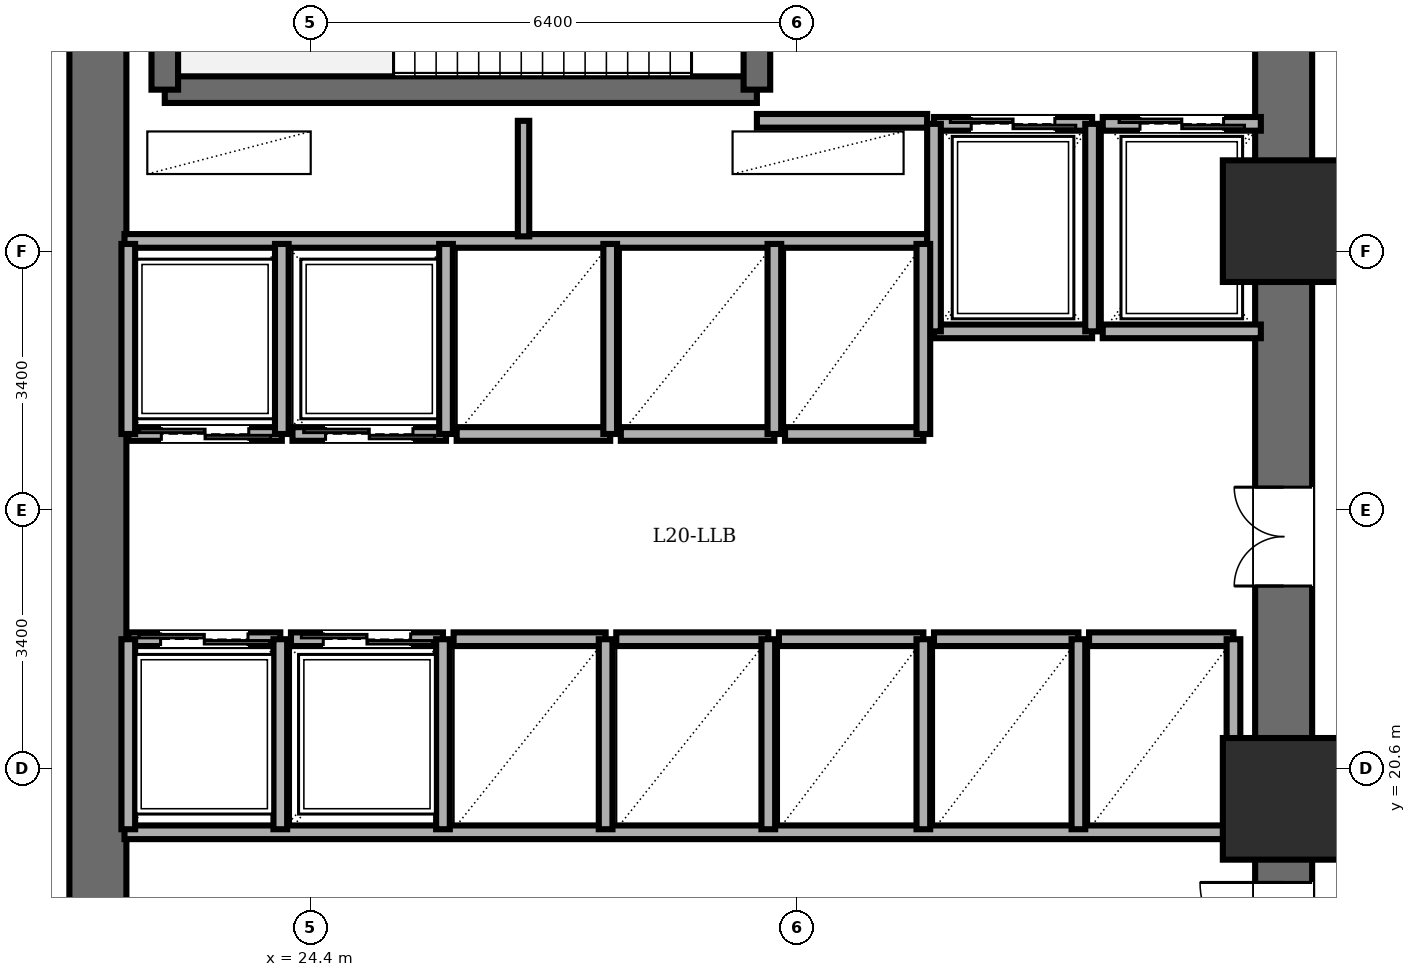
"""IFC4 building model, lengths in metres.
Left out: names, types, materials, properties, quantities, classifications, styles, units other than length and angle.
Written with IfcOpenShell. Run it as: python <this file> out.ifc"""

import sys

from ifc_helpers import new_model, si_unit, direction, frame, frame_2d, origin, origin_2d, place, context, subcontext, project, spatial, rectangle, extrude, element, fill, save


model = new_model("IFC4")
c1 = context("Model", 3, precision=1e-05, world=origin(), true_north=direction((0.0, 1.0)))
c2 = subcontext(c1, "Body", "Model", "MODEL_VIEW")
j1 = project(units=[si_unit("LENGTHUNIT", "METRE"), si_unit("PLANEANGLEUNIT", "RADIAN")], contexts=[c1])
p1 = place(None, origin())
s1 = spatial("IfcSite", under=j1, at=p1, CompositionType="ELEMENT")
p2 = place(p1, origin())
s2 = spatial("IfcBuilding", under=s1, at=p2, CompositionType="ELEMENT")
p3 = place(p2, frame((0.0, 0.0, 75.6)))
s3 = spatial("IfcBuildingStorey", under=s2, at=p3, CompositionType="ELEMENT", Elevation=75.6)
for number, where, z_axis, x_axis in (
    (1, (37.2, 20.2, 0.0), (0.0, 0.0, 1.0), (1.0, 0.0, 0.0)),
    (2, (37.2, 27.8, 0.0), (0.0, 0.0, 1.0), (1.0, 0.0, 0.0)),
):
    element("IfcColumn", number, at=place(p3, frame(where, z_axis=z_axis, x_axis=x_axis)), inside=s3, PredefinedType="COLUMN", context=c2, shape_type="SweptSolid", body=[
        extrude(rectangle(XDim=1.6, YDim=1.6, at=origin_2d()), origin(), (0.0, 0.0, 1.0), 5.6),
    ])
p4 = place(p3, frame((21.6, 14.4, 0.0), z_axis=(0.0, 0.0, 1.0), x_axis=(0.0, 1.0, 0.0)))
e3 = element("IfcWall", 3, at=p4, inside=s3, PredefinedType="SHEAR", context=c2, shape_type="SweptSolid", body=[
    extrude(rectangle(XDim=19.2, YDim=0.75, at=frame_2d((9.6, 0.0))), origin(), (0.0, 0.0, 1.0), 5.36),
])
p5 = place(p3, frame((37.2, 14.4, 0.0), z_axis=(0.0, 0.0, 1.0), x_axis=(0.0, 1.0, 0.0)))
e4 = element("IfcWall", 4, at=p5, inside=s3, PredefinedType="SHEAR", context=c2, shape_type="SweptSolid", body=[
    extrude(rectangle(XDim=19.2, YDim=0.75, at=frame_2d((9.6, 0.0))), origin(), (0.0, 0.0, 1.0), 5.36),
])
p6 = place(p5, frame((15.8, 0.0, 0.0)))
e5 = element("IfcOpeningElement", 5, at=p6, cuts=e4, PredefinedType="OPENING", context=c2, shape_type="SweptSolid", body=[
    extrude(rectangle(XDim=1.15, YDim=2.15, at=frame_2d((0.575, 1.075))), frame((0.0, 0.385, 0.0), z_axis=(0.0, -1.0, 0.0), x_axis=(1.0, 0.0, 0.0)), (0.0, 0.0, 1.0), 0.77),
])
p7 = place(p5, frame((3.6, 0.0, 0.0)))
e6 = element("IfcOpeningElement", 6, at=p7, cuts=e4, PredefinedType="OPENING", context=c2, shape_type="SweptSolid", body=[
    extrude(rectangle(XDim=1.1, YDim=2.15, at=frame_2d((0.55, 1.075))), frame((0.0, 0.385, 0.0), z_axis=(0.0, -1.0, 0.0), x_axis=(1.0, 0.0, 0.0)), (0.0, 0.0, 1.0), 0.77),
])
p8 = place(p5, frame((8.6, 0.0, 0.0)))
e7 = element("IfcOpeningElement", 7, at=p8, cuts=e4, PredefinedType="OPENING", context=c2, shape_type="SweptSolid", body=[
    extrude(rectangle(XDim=1.3, YDim=2.2, at=frame_2d((0.65, 1.1))), frame((0.0, 0.385, 0.0), z_axis=(0.0, -1.0, 0.0), x_axis=(1.0, 0.0, 0.0)), (0.0, 0.0, 1.0), 0.77),
])
p9 = place(p3, frame((22.48, 29.53, 0.0), z_axis=(0.0, 0.0, 1.0), x_axis=(1.0, 0.0, 0.0)))
e8 = element("IfcWall", 8, at=p9, inside=s3, PredefinedType="SOLIDWALL", context=c2, shape_type="SweptSolid", body=[
    extrude(rectangle(XDim=7.79, YDim=0.35, at=frame_2d((3.895, 0.0))), origin(), (0.0, 0.0, 1.0), 5.36),
])
p10 = place(p3, frame((22.48, 29.53, 0.0), z_axis=(0.0, 0.0, 1.0), x_axis=(0.0, 1.0, 0.0)))
e9 = element("IfcWall", 9, at=p10, inside=s3, PredefinedType="SOLIDWALL", context=c2, shape_type="SweptSolid", body=[
    extrude(rectangle(XDim=3.58, YDim=0.35, at=frame_2d((1.79, 0.0))), origin(), (0.0, 0.0, 1.0), 5.36),
])
p11 = place(p3, frame((30.27, 29.53, 0.0), z_axis=(0.0, 0.0, 1.0), x_axis=(0.0, 1.0, 0.0)))
e10 = element("IfcWall", 10, at=p11, inside=s3, PredefinedType="SOLIDWALL", context=c2, shape_type="SweptSolid", body=[
    extrude(rectangle(XDim=3.58, YDim=0.35, at=frame_2d((1.79, 0.0))), origin(), (0.0, 0.0, 1.0), 5.36),
])
p12 = place(p11, frame((1.25, 0.0, 0.0)))
e11 = element("IfcOpeningElement", 11, at=p12, cuts=e10, PredefinedType="OPENING", context=c2, shape_type="SweptSolid", body=[
    extrude(rectangle(XDim=1.1, YDim=2.15, at=frame_2d((0.55, 1.075))), frame((0.0, 0.185, 0.0), z_axis=(0.0, -1.0, 0.0), x_axis=(1.0, 0.0, 0.0)), (0.0, 0.0, 1.0), 0.37),
])
p13 = place(p3, frame((30.27, 29.12, 0.0), z_axis=(0.0, 0.0, 1.0), x_axis=(1.0, 0.0, 0.0)))
e12 = element("IfcWall", 12, at=p13, inside=s3, PredefinedType="PARTITIONING", context=c2, shape_type="SweptSolid", body=[
    extrude(rectangle(XDim=2.24, YDim=0.18, at=frame_2d((1.12, 0.0))), origin(), (0.0, 0.0, 1.0), 5.36),
])
p14 = place(p3, frame((21.95, 27.54, 0.0), z_axis=(0.0, 0.0, 1.0), x_axis=(1.0, 0.0, 0.0)))
e13 = element("IfcWall", 13, at=p14, inside=s3, PredefinedType="PARTITIONING", context=c2, shape_type="SweptSolid", body=[
    extrude(rectangle(XDim=10.56, YDim=0.18, at=frame_2d((5.28, 0.0))), origin(), (0.0, 0.0, 1.0), 5.36),
])
p15 = place(p3, frame((27.2, 27.6, 0.0), z_axis=(0.0, 0.0, 1.0), x_axis=(0.0, 1.0, 0.0)))
e14 = element("IfcWall", 14, at=p15, inside=s3, PredefinedType="PARTITIONING", context=c2, shape_type="SweptSolid", body=[
    extrude(rectangle(XDim=1.52, YDim=0.15, at=frame_2d((0.76, 0.0))), origin(), (0.0, 0.0, 1.0), 5.36),
])
p16 = place(p3, frame((21.95, 19.76, 0.0), z_axis=(0.0, 0.0, 1.0), x_axis=(1.0, 0.0, 0.0)))
e15 = element("IfcWall", 15, at=p16, inside=s3, PredefinedType="PARTITIONING", context=c2, shape_type="SweptSolid", body=[
    extrude(rectangle(XDim=14.87, YDim=0.18, at=frame_2d((7.435, 0.0))), origin(), (0.0, 0.0, 1.0), 5.36),
])
p17 = place(p3, frame((32.6, 29.08, 0.0), z_axis=(0.0, 0.0, 1.0), x_axis=(1.0, 0.0, 0.0)))
e16 = element("IfcWall", 16, at=p17, inside=s3, PredefinedType="PARTITIONING", context=c2, shape_type="SweptSolid", body=[
    extrude(rectangle(XDim=2.08, YDim=0.18, at=frame_2d((1.04, 0.0))), origin(), (0.0, 0.0, 1.0), 5.36),
])
p18 = place(p17, frame((0.49, 0.0, 0.0)))
e17 = element("IfcOpeningElement", 17, at=p18, cuts=e16, PredefinedType="OPENING", context=c2, shape_type="SweptSolid", body=[
    extrude(rectangle(XDim=1.1, YDim=2.2, at=frame_2d((0.55, 1.1))), frame((0.0, 0.1, 0.0), z_axis=(0.0, -1.0, 0.0), x_axis=(1.0, 0.0, 0.0)), (0.0, 0.0, 1.0), 0.2),
])
p19 = place(p3, frame((34.68, 26.35, 0.0), z_axis=(0.0, 0.0, 1.0), x_axis=(-1.0, 0.0, 0.0)))
e18 = element("IfcWall", 18, at=p19, inside=s3, PredefinedType="PARTITIONING", context=c2, shape_type="SweptSolid", body=[
    extrude(rectangle(XDim=2.08, YDim=0.18, at=frame_2d((1.04, 0.0))), origin(), (0.0, 0.0, 1.0), 5.36),
])
for number, where, z_axis, x_axis in (
    (19, (34.68, 26.35, 0.0), (0.0, 0.0, 1.0), (0.0, 1.0, 0.0)),
    (20, (32.6, 29.08, 0.0), (0.0, 0.0, 1.0), (0.0, -1.0, 0.0)),
):
    element("IfcWall", number, at=place(p3, frame(where, z_axis=z_axis, x_axis=x_axis)), inside=s3, PredefinedType="PARTITIONING", context=c2, shape_type="SweptSolid", body=[
        extrude(rectangle(XDim=2.73, YDim=0.18, at=frame_2d((1.365, 0.0))), origin(), (0.0, 0.0, 1.0), 5.36),
    ])
p20 = place(p3, frame((34.82, 29.08, 0.0), z_axis=(0.0, 0.0, 1.0), x_axis=(1.0, 0.0, 0.0)))
e21 = element("IfcWall", 21, at=p20, inside=s3, PredefinedType="PARTITIONING", context=c2, shape_type="SweptSolid", body=[
    extrude(rectangle(XDim=2.08, YDim=0.18, at=frame_2d((1.04, 0.0))), origin(), (0.0, 0.0, 1.0), 5.36),
])
p21 = place(p20, frame((0.49, 0.0, 0.0)))
e22 = element("IfcOpeningElement", 22, at=p21, cuts=e21, PredefinedType="OPENING", context=c2, shape_type="SweptSolid", body=[
    extrude(rectangle(XDim=1.1, YDim=2.2, at=frame_2d((0.55, 1.1))), frame((0.0, 0.1, 0.0), z_axis=(0.0, -1.0, 0.0), x_axis=(1.0, 0.0, 0.0)), (0.0, 0.0, 1.0), 0.2),
])
p22 = place(p3, frame((36.9, 26.35, 0.0), z_axis=(0.0, 0.0, 1.0), x_axis=(-1.0, 0.0, 0.0)))
e23 = element("IfcWall", 23, at=p22, inside=s3, PredefinedType="PARTITIONING", context=c2, shape_type="SweptSolid", body=[
    extrude(rectangle(XDim=2.08, YDim=0.18, at=frame_2d((1.04, 0.0))), origin(), (0.0, 0.0, 1.0), 5.36),
])
p23 = place(p3, frame((24.02, 25.0, 0.0), z_axis=(0.0, 0.0, 1.0), x_axis=(-1.0, 0.0, 0.0)))
e24 = element("IfcWall", 24, at=p23, inside=s3, PredefinedType="PARTITIONING", context=c2, shape_type="SweptSolid", body=[
    extrude(rectangle(XDim=2.02, YDim=0.18, at=frame_2d((1.01, 0.0))), origin(), (0.0, 0.0, 1.0), 5.36),
])
p24 = place(p23, frame((0.435, 0.0, 0.0)))
e25 = element("IfcOpeningElement", 25, at=p24, cuts=e24, PredefinedType="OPENING", context=c2, shape_type="SweptSolid", body=[
    extrude(rectangle(XDim=1.15, YDim=2.2, at=frame_2d((0.575, 1.1))), frame((0.0, 0.1, 0.0), z_axis=(0.0, -1.0, 0.0), x_axis=(1.0, 0.0, 0.0)), (0.0, 0.0, 1.0), 0.2),
])
for number, where, z_axis, x_axis in (
    (26, (24.02, 25.0, 0.0), (0.0, 0.0, 1.0), (0.0, 1.0, 0.0)),
    (27, (22.0, 27.5, 0.0), (0.0, 0.0, 1.0), (0.0, -1.0, 0.0)),
):
    element("IfcWall", number, at=place(p3, frame(where, z_axis=z_axis, x_axis=x_axis)), inside=s3, PredefinedType="PARTITIONING", context=c2, shape_type="SweptSolid", body=[
        extrude(rectangle(XDim=2.5, YDim=0.18, at=frame_2d((1.25, 0.0))), origin(), (0.0, 0.0, 1.0), 5.36),
    ])
p25 = place(p3, frame((26.18, 25.0, 0.0), z_axis=(0.0, 0.0, 1.0), x_axis=(-1.0, 0.0, 0.0)))
e28 = element("IfcWall", 28, at=p25, inside=s3, PredefinedType="PARTITIONING", context=c2, shape_type="SweptSolid", body=[
    extrude(rectangle(XDim=2.02, YDim=0.18, at=frame_2d((1.01, 0.0))), origin(), (0.0, 0.0, 1.0), 5.36),
])
p26 = place(p25, frame((0.435, 0.0, 0.0)))
e29 = element("IfcOpeningElement", 29, at=p26, cuts=e28, PredefinedType="OPENING", context=c2, shape_type="SweptSolid", body=[
    extrude(rectangle(XDim=1.15, YDim=2.2, at=frame_2d((0.575, 1.1))), frame((0.0, 0.1, 0.0), z_axis=(0.0, -1.0, 0.0), x_axis=(1.0, 0.0, 0.0)), (0.0, 0.0, 1.0), 0.2),
])
p27 = place(p3, frame((26.18, 25.0, 0.0), z_axis=(0.0, 0.0, 1.0), x_axis=(0.0, 1.0, 0.0)))
e30 = element("IfcWall", 30, at=p27, inside=s3, PredefinedType="PARTITIONING", context=c2, shape_type="SweptSolid", body=[
    extrude(rectangle(XDim=2.5, YDim=0.18, at=frame_2d((1.25, 0.0))), origin(), (0.0, 0.0, 1.0), 5.36),
])
p28 = place(p3, frame((22.0, 22.3, 0.0), z_axis=(0.0, 0.0, 1.0), x_axis=(1.0, 0.0, 0.0)))
e31 = element("IfcWall", 31, at=p28, inside=s3, PredefinedType="PARTITIONING", context=c2, shape_type="SweptSolid", body=[
    extrude(rectangle(XDim=2.0, YDim=0.18, at=frame_2d((1.0, 0.0))), origin(), (0.0, 0.0, 1.0), 5.36),
])
p29 = place(p28, frame((0.425, 0.0, 0.0)))
e32 = element("IfcOpeningElement", 32, at=p29, cuts=e31, PredefinedType="OPENING", context=c2, shape_type="SweptSolid", body=[
    extrude(rectangle(XDim=1.15, YDim=2.2, at=frame_2d((0.575, 1.1))), frame((0.0, 0.1, 0.0), z_axis=(0.0, -1.0, 0.0), x_axis=(1.0, 0.0, 0.0)), (0.0, 0.0, 1.0), 0.2),
])
for number, where, z_axis, x_axis in (
    (33, (24.0, 19.8, 0.0), (0.0, 0.0, 1.0), (0.0, 1.0, 0.0)),
    (34, (22.0, 22.3, 0.0), (0.0, 0.0, 1.0), (0.0, -1.0, 0.0)),
):
    element("IfcWall", number, at=place(p3, frame(where, z_axis=z_axis, x_axis=x_axis)), inside=s3, PredefinedType="PARTITIONING", context=c2, shape_type="SweptSolid", body=[
        extrude(rectangle(XDim=2.5, YDim=0.18, at=frame_2d((1.25, 0.0))), origin(), (0.0, 0.0, 1.0), 5.36),
    ])
p30 = place(p3, frame((24.14, 22.3, 0.0), z_axis=(0.0, 0.0, 1.0), x_axis=(1.0, 0.0, 0.0)))
e35 = element("IfcWall", 35, at=p30, inside=s3, PredefinedType="PARTITIONING", context=c2, shape_type="SweptSolid", body=[
    extrude(rectangle(XDim=2.0, YDim=0.18, at=frame_2d((1.0, 0.0))), origin(), (0.0, 0.0, 1.0), 5.36),
])
p31 = place(p30, frame((0.425, 0.0, 0.0)))
e36 = element("IfcOpeningElement", 36, at=p31, cuts=e35, PredefinedType="OPENING", context=c2, shape_type="SweptSolid", body=[
    extrude(rectangle(XDim=1.15, YDim=2.2, at=frame_2d((0.575, 1.1))), frame((0.0, 0.1, 0.0), z_axis=(0.0, -1.0, 0.0), x_axis=(1.0, 0.0, 0.0)), (0.0, 0.0, 1.0), 0.2),
])
p32 = place(p3, frame((26.14, 19.8, 0.0), z_axis=(0.0, 0.0, 1.0), x_axis=(0.0, 1.0, 0.0)))
e37 = element("IfcWall", 37, at=p32, inside=s3, PredefinedType="PARTITIONING", context=c2, shape_type="SweptSolid", body=[
    extrude(rectangle(XDim=2.5, YDim=0.18, at=frame_2d((1.25, 0.0))), origin(), (0.0, 0.0, 1.0), 5.36),
])
p33 = place(p3, frame((28.34, 25.0, 0.0), z_axis=(0.0, 0.0, 1.0), x_axis=(-1.0, 0.0, 0.0)))
e38 = element("IfcWall", 38, at=p33, inside=s3, PredefinedType="PARTITIONING", context=c2, shape_type="SweptSolid", body=[
    extrude(rectangle(XDim=2.02, YDim=0.18, at=frame_2d((1.01, 0.0))), origin(), (0.0, 0.0, 1.0), 5.36),
])
p34 = place(p3, frame((28.34, 25.0, 0.0), z_axis=(0.0, 0.0, 1.0), x_axis=(0.0, 1.0, 0.0)))
e39 = element("IfcWall", 39, at=p34, inside=s3, PredefinedType="PARTITIONING", context=c2, shape_type="SweptSolid", body=[
    extrude(rectangle(XDim=2.5, YDim=0.18, at=frame_2d((1.25, 0.0))), origin(), (0.0, 0.0, 1.0), 5.36),
])
p35 = place(p3, frame((30.5, 25.0, 0.0), z_axis=(0.0, 0.0, 1.0), x_axis=(-1.0, 0.0, 0.0)))
e40 = element("IfcWall", 40, at=p35, inside=s3, PredefinedType="PARTITIONING", context=c2, shape_type="SweptSolid", body=[
    extrude(rectangle(XDim=2.02, YDim=0.18, at=frame_2d((1.01, 0.0))), origin(), (0.0, 0.0, 1.0), 5.36),
])
p36 = place(p3, frame((30.5, 25.0, 0.0), z_axis=(0.0, 0.0, 1.0), x_axis=(0.0, 1.0, 0.0)))
e41 = element("IfcWall", 41, at=p36, inside=s3, PredefinedType="PARTITIONING", context=c2, shape_type="SweptSolid", body=[
    extrude(rectangle(XDim=2.5, YDim=0.18, at=frame_2d((1.25, 0.0))), origin(), (0.0, 0.0, 1.0), 5.36),
])
p37 = place(p3, frame((26.28, 22.3, 0.0), z_axis=(0.0, 0.0, 1.0), x_axis=(1.0, 0.0, 0.0)))
e42 = element("IfcWall", 42, at=p37, inside=s3, PredefinedType="PARTITIONING", context=c2, shape_type="SweptSolid", body=[
    extrude(rectangle(XDim=2.0, YDim=0.18, at=frame_2d((1.0, 0.0))), origin(), (0.0, 0.0, 1.0), 5.36),
])
p38 = place(p3, frame((28.28, 19.8, 0.0), z_axis=(0.0, 0.0, 1.0), x_axis=(0.0, 1.0, 0.0)))
e43 = element("IfcWall", 43, at=p38, inside=s3, PredefinedType="PARTITIONING", context=c2, shape_type="SweptSolid", body=[
    extrude(rectangle(XDim=2.5, YDim=0.18, at=frame_2d((1.25, 0.0))), origin(), (0.0, 0.0, 1.0), 5.36),
])
p39 = place(p3, frame((28.42, 22.3, 0.0), z_axis=(0.0, 0.0, 1.0), x_axis=(1.0, 0.0, 0.0)))
e44 = element("IfcWall", 44, at=p39, inside=s3, PredefinedType="PARTITIONING", context=c2, shape_type="SweptSolid", body=[
    extrude(rectangle(XDim=2.0, YDim=0.18, at=frame_2d((1.0, 0.0))), origin(), (0.0, 0.0, 1.0), 5.36),
])
p40 = place(p3, frame((30.42, 19.8, 0.0), z_axis=(0.0, 0.0, 1.0), x_axis=(0.0, 1.0, 0.0)))
e45 = element("IfcWall", 45, at=p40, inside=s3, PredefinedType="PARTITIONING", context=c2, shape_type="SweptSolid", body=[
    extrude(rectangle(XDim=2.5, YDim=0.18, at=frame_2d((1.25, 0.0))), origin(), (0.0, 0.0, 1.0), 5.36),
])
p41 = place(p3, frame((32.46, 25.0, 0.0), z_axis=(0.0, 0.0, 1.0), x_axis=(-1.0, 0.0, 0.0)))
e46 = element("IfcWall", 46, at=p41, inside=s3, PredefinedType="PARTITIONING", context=c2, shape_type="SweptSolid", body=[
    extrude(rectangle(XDim=1.82, YDim=0.18, at=frame_2d((0.91, 0.0))), origin(), (0.0, 0.0, 1.0), 5.36),
])
p42 = place(p3, frame((32.46, 25.0, 0.0), z_axis=(0.0, 0.0, 1.0), x_axis=(0.0, 1.0, 0.0)))
e47 = element("IfcWall", 47, at=p42, inside=s3, PredefinedType="PARTITIONING", context=c2, shape_type="SweptSolid", body=[
    extrude(rectangle(XDim=2.5, YDim=0.18, at=frame_2d((1.25, 0.0))), origin(), (0.0, 0.0, 1.0), 5.36),
])
p43 = place(p3, frame((30.56, 22.3, 0.0), z_axis=(0.0, 0.0, 1.0), x_axis=(1.0, 0.0, 0.0)))
e48 = element("IfcWall", 48, at=p43, inside=s3, PredefinedType="PARTITIONING", context=c2, shape_type="SweptSolid", body=[
    extrude(rectangle(XDim=1.9, YDim=0.18, at=frame_2d((0.95, 0.0))), origin(), (0.0, 0.0, 1.0), 5.36),
])
p44 = place(p3, frame((32.46, 19.8, 0.0), z_axis=(0.0, 0.0, 1.0), x_axis=(0.0, 1.0, 0.0)))
e49 = element("IfcWall", 49, at=p44, inside=s3, PredefinedType="PARTITIONING", context=c2, shape_type="SweptSolid", body=[
    extrude(rectangle(XDim=2.5, YDim=0.18, at=frame_2d((1.25, 0.0))), origin(), (0.0, 0.0, 1.0), 5.36),
])
p45 = place(p3, frame((32.6, 22.3, 0.0), z_axis=(0.0, 0.0, 1.0), x_axis=(1.0, 0.0, 0.0)))
e50 = element("IfcWall", 50, at=p45, inside=s3, PredefinedType="PARTITIONING", context=c2, shape_type="SweptSolid", body=[
    extrude(rectangle(XDim=1.9, YDim=0.18, at=frame_2d((0.95, 0.0))), origin(), (0.0, 0.0, 1.0), 5.36),
])
p46 = place(p3, frame((34.5, 19.8, 0.0), z_axis=(0.0, 0.0, 1.0), x_axis=(0.0, 1.0, 0.0)))
e51 = element("IfcWall", 51, at=p46, inside=s3, PredefinedType="PARTITIONING", context=c2, shape_type="SweptSolid", body=[
    extrude(rectangle(XDim=2.5, YDim=0.18, at=frame_2d((1.25, 0.0))), origin(), (0.0, 0.0, 1.0), 5.36),
])
p47 = place(p3, frame((34.64, 22.3, 0.0), z_axis=(0.0, 0.0, 1.0), x_axis=(1.0, 0.0, 0.0)))
e52 = element("IfcWall", 52, at=p47, inside=s3, PredefinedType="PARTITIONING", context=c2, shape_type="SweptSolid", body=[
    extrude(rectangle(XDim=1.9, YDim=0.18, at=frame_2d((0.95, 0.0))), origin(), (0.0, 0.0, 1.0), 5.36),
])
p48 = place(p3, frame((36.54, 19.8, 0.0), z_axis=(0.0, 0.0, 1.0), x_axis=(0.0, 1.0, 0.0)))
e53 = element("IfcWall", 53, at=p48, inside=s3, PredefinedType="PARTITIONING", context=c2, shape_type="SweptSolid", body=[
    extrude(rectangle(XDim=2.5, YDim=0.18, at=frame_2d((1.25, 0.0))), origin(), (0.0, 0.0, 1.0), 5.36),
])
p49 = place(p7, origin())
e54 = element("IfcDoor", 54, at=p49, inside=s3, OperationType="SINGLE_SWING_RIGHT", PredefinedType="DOOR", context=c2, shape_type="SweptSolid", body=[
    extrude(rectangle(XDim=1.1, YDim=2.15, at=frame_2d((0.55, 1.075))), frame((0.0, 0.025, 0.0), z_axis=(0.0, -1.0, 0.0), x_axis=(1.0, 0.0, 0.0)), (0.0, 0.0, 1.0), 0.05),
])
fill(e6, e54)
p50 = place(p18, origin())
e55 = element("IfcDoor", 55, at=p50, inside=s3, OperationType="DOUBLE_DOOR_SLIDING", PredefinedType="DOOR", context=c2, shape_type="SweptSolid", body=[
    extrude(rectangle(XDim=1.1, YDim=2.2, at=frame_2d((0.55, 1.1))), frame((0.0, 0.025, 0.0), z_axis=(0.0, -1.0, 0.0), x_axis=(1.0, 0.0, 0.0)), (0.0, 0.0, 1.0), 0.05),
])
fill(e17, e55)
p51 = place(p21, origin())
e56 = element("IfcDoor", 56, at=p51, inside=s3, OperationType="DOUBLE_DOOR_SLIDING", PredefinedType="DOOR", context=c2, shape_type="SweptSolid", body=[
    extrude(rectangle(XDim=1.1, YDim=2.2, at=frame_2d((0.55, 1.1))), frame((0.0, 0.025, 0.0), z_axis=(0.0, -1.0, 0.0), x_axis=(1.0, 0.0, 0.0)), (0.0, 0.0, 1.0), 0.05),
])
fill(e22, e56)
p52 = place(p24, origin())
e57 = element("IfcDoor", 57, at=p52, inside=s3, OperationType="DOUBLE_DOOR_SLIDING", PredefinedType="DOOR", context=c2, shape_type="SweptSolid", body=[
    extrude(rectangle(XDim=1.15, YDim=2.2, at=frame_2d((0.575, 1.1))), frame((0.0, 0.025, 0.0), z_axis=(0.0, -1.0, 0.0), x_axis=(1.0, 0.0, 0.0)), (0.0, 0.0, 1.0), 0.05),
])
fill(e25, e57)
p53 = place(p26, origin())
e58 = element("IfcDoor", 58, at=p53, inside=s3, OperationType="DOUBLE_DOOR_SLIDING", PredefinedType="DOOR", context=c2, shape_type="SweptSolid", body=[
    extrude(rectangle(XDim=1.15, YDim=2.2, at=frame_2d((0.575, 1.1))), frame((0.0, 0.025, 0.0), z_axis=(0.0, -1.0, 0.0), x_axis=(1.0, 0.0, 0.0)), (0.0, 0.0, 1.0), 0.05),
])
fill(e29, e58)
p54 = place(p29, origin())
e59 = element("IfcDoor", 59, at=p54, inside=s3, OperationType="DOUBLE_DOOR_SLIDING", PredefinedType="DOOR", context=c2, shape_type="SweptSolid", body=[
    extrude(rectangle(XDim=1.15, YDim=2.2, at=frame_2d((0.575, 1.1))), frame((0.0, 0.025, 0.0), z_axis=(0.0, -1.0, 0.0), x_axis=(1.0, 0.0, 0.0)), (0.0, 0.0, 1.0), 0.05),
])
fill(e32, e59)
p55 = place(p31, origin())
e60 = element("IfcDoor", 60, at=p55, inside=s3, OperationType="DOUBLE_DOOR_SLIDING", PredefinedType="DOOR", context=c2, shape_type="SweptSolid", body=[
    extrude(rectangle(XDim=1.15, YDim=2.2, at=frame_2d((0.575, 1.1))), frame((0.0, 0.025, 0.0), z_axis=(0.0, -1.0, 0.0), x_axis=(1.0, 0.0, 0.0)), (0.0, 0.0, 1.0), 0.05),
])
fill(e36, e60)
p56 = place(p8, origin())
e61 = element("IfcDoor", 61, at=p56, inside=s3, OperationType="DOUBLE_DOOR_SINGLE_SWING", PredefinedType="DOOR", context=c2, shape_type="SweptSolid", body=[
    extrude(rectangle(XDim=1.3, YDim=2.2, at=frame_2d((0.65, 1.1))), frame((0.0, 0.025, 0.0), z_axis=(0.0, -1.0, 0.0), x_axis=(1.0, 0.0, 0.0)), (0.0, 0.0, 1.0), 0.05),
])
fill(e7, e61)
save(model, sys.argv[1])
